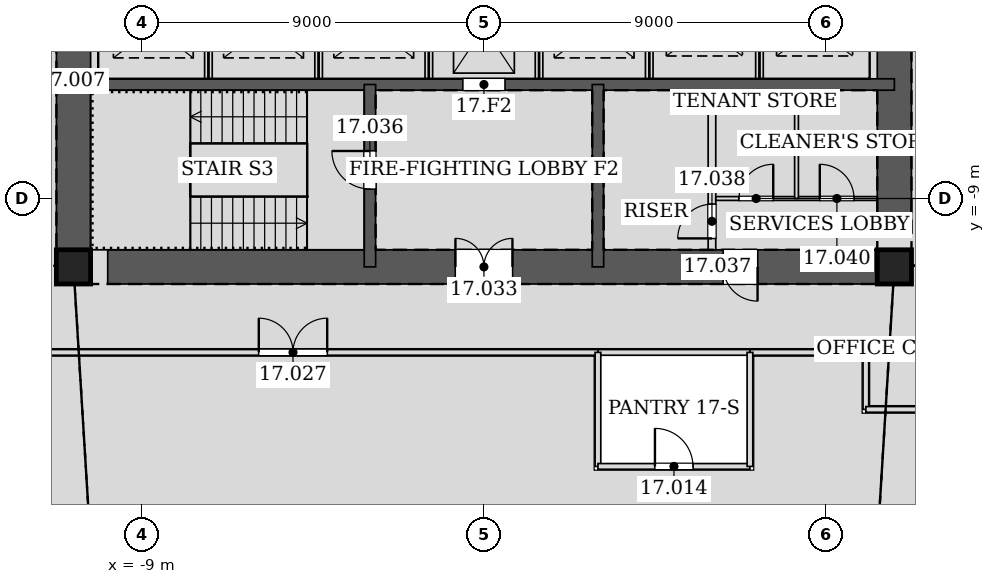
"""IFC4 building model, lengths in metres.
Left out: names, types, materials, properties, quantities, classifications, styles, units other than length and angle.
Written with IfcOpenShell. Run it as: python <this file> out.ifc"""

import sys

from ifc_helpers import new_model, si_unit, direction, frame, frame_2d, origin, origin_2d, place, context, subcontext, project, spatial, rectangle, hollow_rectangle, extrude, element, fill, save


model = new_model("IFC4")
c1 = context("Model", 3, precision=1e-05, world=origin(), true_north=direction((0.0, 1.0)))
c2 = subcontext(c1, "Body", "Model", "MODEL_VIEW")
j1 = project(units=[si_unit("LENGTHUNIT", "METRE"), si_unit("PLANEANGLEUNIT", "RADIAN")], contexts=[c1])
p1 = place(None, origin())
s1 = spatial("IfcSite", under=j1, at=p1, CompositionType="ELEMENT")
p2 = place(p1, origin())
s2 = spatial("IfcBuilding", under=s1, at=p2, CompositionType="ELEMENT")
p3 = place(p2, frame((0.0, 0.0, 79.2)))
s3 = spatial("IfcBuildingStorey", under=s2, at=p3, CompositionType="ELEMENT", Elevation=79.2)
for number, where, z_axis, x_axis in (
    (1, (-10.8, -10.8, 0.0), (0.0, 0.0, 1.0), (1.0, 0.0, 0.0)),
    (2, (10.8, -10.8, 0.0), (0.0, 0.0, 1.0), (1.0, 0.0, 0.0)),
):
    element("IfcColumn", number, at=place(p3, frame(where, z_axis=z_axis, x_axis=x_axis)), inside=s3, PredefinedType="COLUMN", context=c2, shape_type="SweptSolid", body=[
        extrude(hollow_rectangle(XDim=0.9, YDim=0.9, WallThickness=0.06, at=origin_2d()), origin(), (0.0, 0.0, 1.0), 4.2),
    ])
p4 = place(p3, frame((-10.8, -10.8, 0.0), z_axis=(0.0, 0.0, 1.0), x_axis=(1.0, 0.0, 0.0)))
e3 = element("IfcWall", 3, at=p4, inside=s3, PredefinedType="SOLIDWALL", context=c2, shape_type="SweptSolid", body=[
    extrude(rectangle(XDim=21.6, YDim=0.9, at=frame_2d((10.8, 0.0))), origin(), (0.0, 0.0, 1.0), 4.2),
])
p5 = place(p4, frame((10.05, 0.0, 0.0)))
e4 = element("IfcOpeningElement", 4, at=p5, cuts=e3, PredefinedType="OPENING", context=c2, shape_type="SweptSolid", body=[
    extrude(rectangle(XDim=1.5, YDim=2.1, at=frame_2d((0.75, 1.05))), frame((0.0, 0.46, 0.0), z_axis=(0.0, -1.0, 0.0), x_axis=(1.0, 0.0, 0.0)), (0.0, 0.0, 1.0), 0.92),
])
p6 = place(p4, frame((17.1, 0.0, 0.0)))
e5 = element("IfcOpeningElement", 5, at=p6, cuts=e3, PredefinedType="OPENING", context=c2, shape_type="SweptSolid", body=[
    extrude(rectangle(XDim=0.9, YDim=2.1, at=frame_2d((0.45, 1.05))), frame((0.0, 0.46, 0.0), z_axis=(0.0, -1.0, 0.0), x_axis=(1.0, 0.0, 0.0)), (0.0, 0.0, 1.0), 0.92),
])
p7 = place(p3, frame((10.8, -10.8, 0.0), z_axis=(0.0, 0.0, 1.0), x_axis=(0.0, 1.0, 0.0)))
e6 = element("IfcWall", 6, at=p7, inside=s3, PredefinedType="SOLIDWALL", context=c2, shape_type="SweptSolid", body=[
    extrude(rectangle(XDim=21.6, YDim=0.9, at=frame_2d((10.8, 0.0))), origin(), (0.0, 0.0, 1.0), 4.2),
])
p8 = place(p7, frame((11.7, 0.0, 0.0)))
e7 = element("IfcOpeningElement", 7, at=p8, cuts=e6, PredefinedType="OPENING", context=c2, shape_type="SweptSolid", body=[
    extrude(rectangle(XDim=1.2, YDim=2.1, at=frame_2d((0.6, 1.05))), frame((0.0, 0.46, 0.0), z_axis=(0.0, -1.0, 0.0), x_axis=(1.0, 0.0, 0.0)), (0.0, 0.0, 1.0), 0.92),
])
p9 = place(p7, frame((8.7, 0.0, 0.0)))
e8 = element("IfcOpeningElement", 8, at=p9, cuts=e6, PredefinedType="OPENING", context=c2, shape_type="SweptSolid", body=[
    extrude(rectangle(XDim=1.2, YDim=2.1, at=frame_2d((0.6, 1.05))), frame((0.0, 0.46, 0.0), z_axis=(0.0, -1.0, 0.0), x_axis=(1.0, 0.0, 0.0)), (0.0, 0.0, 1.0), 0.92),
])
p10 = place(p3, frame((-10.8, 10.8, 0.0), z_axis=(0.0, 0.0, 1.0), x_axis=(0.0, -1.0, 0.0)))
e9 = element("IfcWall", 9, at=p10, inside=s3, PredefinedType="SOLIDWALL", context=c2, shape_type="SweptSolid", body=[
    extrude(rectangle(XDim=21.6, YDim=0.9, at=frame_2d((10.8, 0.0))), origin(), (0.0, 0.0, 1.0), 4.2),
])
p11 = place(p10, frame((8.7, 0.0, 0.0)))
e10 = element("IfcOpeningElement", 10, at=p11, cuts=e9, PredefinedType="OPENING", context=c2, shape_type="SweptSolid", body=[
    extrude(rectangle(XDim=1.2, YDim=2.1, at=frame_2d((0.6, 1.05))), frame((0.0, 0.46, 0.0), z_axis=(0.0, -1.0, 0.0), x_axis=(1.0, 0.0, 0.0)), (0.0, 0.0, 1.0), 0.92),
])
p12 = place(p10, frame((11.7, 0.0, 0.0)))
e11 = element("IfcOpeningElement", 11, at=p12, cuts=e9, PredefinedType="OPENING", context=c2, shape_type="SweptSolid", body=[
    extrude(rectangle(XDim=1.2, YDim=2.1, at=frame_2d((0.6, 1.05))), frame((0.0, 0.46, 0.0), z_axis=(0.0, -1.0, 0.0), x_axis=(1.0, 0.0, 0.0)), (0.0, 0.0, 1.0), 0.92),
])
p13 = place(p3, frame((-10.8, -6.0, 0.0), z_axis=(0.0, 0.0, 1.0), x_axis=(1.0, 0.0, 0.0)))
e12 = element("IfcWall", 12, at=p13, inside=s3, PredefinedType="SOLIDWALL", context=c2, shape_type="SweptSolid", body=[
    extrude(rectangle(XDim=21.6, YDim=0.3, at=frame_2d((10.8, 0.0))), origin(), (0.0, 0.0, 1.0), 4.2),
])
p14 = place(p13, frame((10.25, 0.0, 0.0)))
e13 = element("IfcOpeningElement", 13, at=p14, cuts=e12, PredefinedType="OPENING", context=c2, shape_type="SweptSolid", body=[
    extrude(rectangle(XDim=1.1, YDim=2.1, at=frame_2d((0.55, 1.05))), frame((0.0, 0.16, 0.0), z_axis=(0.0, -1.0, 0.0), x_axis=(1.0, 0.0, 0.0)), (0.0, 0.0, 1.0), 0.32),
])
p15 = place(p3, frame((-3.0, -6.0, 0.0), z_axis=(0.0, 0.0, 1.0), x_axis=(0.0, -1.0, 0.0)))
e14 = element("IfcWall", 14, at=p15, inside=s3, PredefinedType="SOLIDWALL", context=c2, shape_type="SweptSolid", body=[
    extrude(rectangle(XDim=4.8, YDim=0.3, at=frame_2d((2.4, 0.0))), origin(), (0.0, 0.0, 1.0), 4.2),
])
p16 = place(p15, frame((1.75, 0.0, 0.0)))
e15 = element("IfcOpeningElement", 15, at=p16, cuts=e14, PredefinedType="OPENING", context=c2, shape_type="SweptSolid", body=[
    extrude(rectangle(XDim=1.0, YDim=2.1, at=frame_2d((0.5, 1.05))), frame((0.0, 0.16, 0.0), z_axis=(0.0, -1.0, 0.0), x_axis=(1.0, 0.0, 0.0)), (0.0, 0.0, 1.0), 0.32),
])
p17 = place(p3, frame((3.0, -6.0, 0.0), z_axis=(0.0, 0.0, 1.0), x_axis=(0.0, -1.0, 0.0)))
e16 = element("IfcWall", 16, at=p17, inside=s3, PredefinedType="SOLIDWALL", context=c2, shape_type="SweptSolid", body=[
    extrude(rectangle(XDim=4.8, YDim=0.3, at=frame_2d((2.4, 0.0))), origin(), (0.0, 0.0, 1.0), 4.2),
])
p18 = place(p3, frame((2.999, -13.05, 0.0), z_axis=(0.0, 0.0, 1.0), x_axis=(1.0, 0.0, 0.0)))
e17 = element("IfcWall", 17, at=p18, inside=s3, PredefinedType="PARTITIONING", context=c2, shape_type="SweptSolid", body=[
    extrude(rectangle(XDim=4.002, YDim=0.15, at=frame_2d((2.001, 0.0))), origin(), (0.0, 0.0, 1.0), 4.035),
])
p19 = place(p3, frame((-13.05, -13.05, 0.0), z_axis=(0.0, 0.0, 1.0), x_axis=(1.0, 0.0, 0.0)))
e18 = element("IfcWall", 18, at=p19, inside=s3, PredefinedType="PARTITIONING", context=c2, shape_type="SweptSolid", body=[
    extrude(rectangle(XDim=16.051, YDim=0.15, at=frame_2d((8.025, 0.0))), origin(), (0.0, 0.0, 1.0), 3.014),
])
p20 = place(p19, frame((7.125, 0.0, 0.0)))
e19 = element("IfcOpeningElement", 19, at=p20, cuts=e18, PredefinedType="OPENING", context=c2, shape_type="SweptSolid", body=[
    extrude(rectangle(XDim=1.8, YDim=2.4, at=frame_2d((0.9, 1.2))), frame((0.0, 0.085, 0.0), z_axis=(0.0, -1.0, 0.0), x_axis=(1.0, 0.0, 0.0)), (0.0, 0.0, 1.0), 0.17),
])
p21 = place(p3, frame((6.999, -13.05, 0.0), z_axis=(0.0, 0.0, 1.0), x_axis=(1.0, 0.0, 0.0)))
e20 = element("IfcWall", 20, at=p21, inside=s3, PredefinedType="PARTITIONING", context=c2, shape_type="SweptSolid", body=[
    extrude(rectangle(XDim=3.051, YDim=0.15, at=frame_2d((1.525, 0.0))), origin(), (0.0, 0.0, 1.0), 4.035),
])
p22 = place(p3, frame((10.05, -13.05, 0.0), z_axis=(0.0, 0.0, 1.0), x_axis=(0.0, -1.0, 0.0)))
e21 = element("IfcWall", 21, at=p22, inside=s3, PredefinedType="PARTITIONING", context=c2, shape_type="SweptSolid", body=[
    extrude(rectangle(XDim=1.5, YDim=0.15, at=frame_2d((0.75, 0.0))), origin(), (0.0, 0.0, 1.0), 3.492),
])
p23 = place(p3, frame((10.05, -14.55, 0.0), z_axis=(0.0, 0.0, 1.0), x_axis=(1.0, 0.0, 0.0)))
e22 = element("IfcWall", 22, at=p23, inside=s3, PredefinedType="PARTITIONING", context=c2, shape_type="SweptSolid", body=[
    extrude(rectangle(XDim=4.5, YDim=0.15, at=frame_2d((2.25, 0.0))), origin(), (0.0, 0.0, 1.0), 3.014),
])
p24 = place(p3, frame((3.0, -13.05, 0.0), z_axis=(0.0, 0.0, 1.0), x_axis=(0.0, -1.0, 0.0)))
e23 = element("IfcWall", 23, at=p24, inside=s3, PredefinedType="PARTITIONING", context=c2, shape_type="SweptSolid", body=[
    extrude(rectangle(XDim=3.0, YDim=0.15, at=frame_2d((1.5, 0.0))), origin(), (0.0, 0.0, 1.0), 3.492),
])
p25 = place(p3, frame((3.0, -16.05, 0.0), z_axis=(0.0, 0.0, 1.0), x_axis=(1.0, 0.0, 0.0)))
e24 = element("IfcWall", 24, at=p25, inside=s3, PredefinedType="PARTITIONING", context=c2, shape_type="SweptSolid", body=[
    extrude(rectangle(XDim=4.0, YDim=0.15, at=frame_2d((2.0, 0.0))), origin(), (0.0, 0.0, 1.0), 4.035),
])
p26 = place(p25, frame((1.5, 0.0, 0.0)))
e25 = element("IfcOpeningElement", 25, at=p26, cuts=e24, PredefinedType="OPENING", context=c2, shape_type="SweptSolid", body=[
    extrude(rectangle(XDim=1.0, YDim=2.1, at=frame_2d((0.5, 1.05))), frame((0.0, 0.085, 0.0), z_axis=(0.0, -1.0, 0.0), x_axis=(1.0, 0.0, 0.0)), (0.0, 0.0, 1.0), 0.17),
])
p27 = place(p3, frame((7.0, -16.05, 0.0), z_axis=(0.0, 0.0, 1.0), x_axis=(0.0, 1.0, 0.0)))
e26 = element("IfcWall", 26, at=p27, inside=s3, PredefinedType="PARTITIONING", context=c2, shape_type="SweptSolid", body=[
    extrude(rectangle(XDim=3.0, YDim=0.15, at=frame_2d((1.5, 0.0))), origin(), (0.0, 0.0, 1.0), 3.492),
])
for number, where, z_axis, x_axis in (
    (27, (-7.25, -5.85, 0.0), (0.0, 0.0, 1.0), (0.0, 1.0, 0.0)),
    (28, (-4.35, -5.85, 0.0), (0.0, 0.0, 1.0), (0.0, 1.0, 0.0)),
    (29, (-1.45, -5.85, 0.0), (0.0, 0.0, 1.0), (0.0, 1.0, 0.0)),
    (30, (1.45, -5.85, 0.0), (0.0, 0.0, 1.0), (0.0, 1.0, 0.0)),
    (31, (4.35, -5.85, 0.0), (0.0, 0.0, 1.0), (0.0, 1.0, 0.0)),
    (32, (7.25, -5.85, 0.0), (0.0, 0.0, 1.0), (0.0, 1.0, 0.0)),
):
    element("IfcWall", number, at=place(p3, frame(where, z_axis=z_axis, x_axis=x_axis)), inside=s3, PredefinedType="PARTITIONING", context=c2, shape_type="SweptSolid", body=[
        extrude(rectangle(XDim=2.7, YDim=0.2, at=frame_2d((1.35, 0.0))), origin(), (0.0, 0.0, 1.0), 4.2),
    ])
p28 = place(p3, frame((6.0, -10.35, 0.0), z_axis=(0.0, 0.0, 1.0), x_axis=(0.0, 1.0, 0.0)))
e33 = element("IfcWall", 33, at=p28, inside=s3, PredefinedType="PARTITIONING", context=c2, shape_type="SweptSolid", body=[
    extrude(rectangle(XDim=4.2, YDim=0.2, at=frame_2d((2.1, 0.0))), origin(), (0.0, 0.0, 1.0), 4.035),
])
p29 = place(p28, frame((0.3, 0.0, 0.0)))
e34 = element("IfcOpeningElement", 34, at=p29, cuts=e33, PredefinedType="OPENING", context=c2, shape_type="SweptSolid", body=[
    extrude(rectangle(XDim=0.9, YDim=2.1, at=frame_2d((0.45, 1.05))), frame((0.0, 0.11, 0.0), z_axis=(0.0, -1.0, 0.0), x_axis=(1.0, 0.0, 0.0)), (0.0, 0.0, 1.0), 0.22),
])
p30 = place(p3, frame((6.1, -9.0, 0.0), z_axis=(0.0, 0.0, 1.0), x_axis=(1.0, 0.0, 0.0)))
e35 = element("IfcWall", 35, at=p30, inside=s3, PredefinedType="PARTITIONING", context=c2, shape_type="SweptSolid", body=[
    extrude(rectangle(XDim=4.25, YDim=0.1, at=frame_2d((2.125, 0.0))), origin(), (0.0, 0.0, 1.0), 4.035),
])
p31 = place(p30, frame((0.613, 0.0, 0.0)))
e36 = element("IfcOpeningElement", 36, at=p31, cuts=e35, PredefinedType="OPENING", context=c2, shape_type="SweptSolid", body=[
    extrude(rectangle(XDim=0.9, YDim=2.1, at=frame_2d((0.45, 1.05))), frame((0.0, 0.06, 0.0), z_axis=(0.0, -1.0, 0.0), x_axis=(1.0, 0.0, 0.0)), (0.0, 0.0, 1.0), 0.12),
])
p32 = place(p30, frame((2.738, 0.0, 0.0)))
e37 = element("IfcOpeningElement", 37, at=p32, cuts=e35, PredefinedType="OPENING", context=c2, shape_type="SweptSolid", body=[
    extrude(rectangle(XDim=0.9, YDim=2.1, at=frame_2d((0.45, 1.05))), frame((0.0, 0.06, 0.0), z_axis=(0.0, -1.0, 0.0), x_axis=(1.0, 0.0, 0.0)), (0.0, 0.0, 1.0), 0.12),
])
p33 = place(p3, frame((8.225, -9.0, 0.0), z_axis=(0.0, 0.0, 1.0), x_axis=(0.0, 1.0, 0.0)))
e38 = element("IfcWall", 38, at=p33, inside=s3, PredefinedType="PARTITIONING", context=c2, shape_type="SweptSolid", body=[
    extrude(rectangle(XDim=2.85, YDim=0.1, at=frame_2d((1.425, 0.0))), origin(), (0.0, 0.0, 1.0), 4.035),
])
p34 = place(p26, origin())
e39 = element("IfcDoor", 39, at=p34, inside=s3, OperationType="SINGLE_SWING_LEFT", PredefinedType="DOOR", context=c2, shape_type="SweptSolid", body=[
    extrude(rectangle(XDim=1.0, YDim=2.1, at=frame_2d((0.5, 1.05))), frame((0.0, 0.025, 0.0), z_axis=(0.0, -1.0, 0.0), x_axis=(1.0, 0.0, 0.0)), (0.0, 0.0, 1.0), 0.05),
])
fill(e25, e39)
p35 = place(p20, origin())
e40 = element("IfcDoor", 40, at=p35, inside=s3, OperationType="DOUBLE_DOOR_SINGLE_SWING", PredefinedType="DOOR", context=c2, shape_type="SweptSolid", body=[
    extrude(rectangle(XDim=1.8, YDim=2.4, at=frame_2d((0.9, 1.2))), frame((0.0, 0.025, 0.0), z_axis=(0.0, -1.0, 0.0), x_axis=(1.0, 0.0, 0.0)), (0.0, 0.0, 1.0), 0.05),
])
fill(e19, e40)
p36 = place(p5, origin())
e41 = element("IfcDoor", 41, at=p36, inside=s3, OperationType="DOUBLE_DOOR_SINGLE_SWING", PredefinedType="DOOR", context=c2, shape_type="SweptSolid", body=[
    extrude(rectangle(XDim=1.5, YDim=2.1, at=frame_2d((0.75, 1.05))), frame((0.0, 0.025, 0.0), z_axis=(0.0, -1.0, 0.0), x_axis=(1.0, 0.0, 0.0)), (0.0, 0.0, 1.0), 0.05),
])
fill(e4, e41)
p37 = place(p16, frame((1.0, 0.0, 0.0), z_axis=(0.0, 0.0, 1.0), x_axis=(-1.0, 0.0, 0.0)))
e42 = element("IfcDoor", 42, at=p37, inside=s3, OperationType="SINGLE_SWING_RIGHT", PredefinedType="DOOR", context=c2, shape_type="SweptSolid", body=[
    extrude(rectangle(XDim=1.0, YDim=2.1, at=frame_2d((0.5, 1.05))), frame((0.0, 0.025, 0.0), z_axis=(0.0, -1.0, 0.0), x_axis=(1.0, 0.0, 0.0)), (0.0, 0.0, 1.0), 0.05),
])
fill(e15, e42)
p38 = place(p6, frame((0.9, 0.0, 0.0), z_axis=(0.0, 0.0, 1.0), x_axis=(-1.0, 0.0, 0.0)))
e43 = element("IfcDoor", 43, at=p38, inside=s3, OperationType="SINGLE_SWING_LEFT", PredefinedType="DOOR", context=c2, shape_type="SweptSolid", body=[
    extrude(rectangle(XDim=0.9, YDim=2.1, at=frame_2d((0.45, 1.05))), frame((0.0, 0.025, 0.0), z_axis=(0.0, -1.0, 0.0), x_axis=(1.0, 0.0, 0.0)), (0.0, 0.0, 1.0), 0.05),
])
fill(e5, e43)
p39 = place(p29, origin())
e44 = element("IfcDoor", 44, at=p39, inside=s3, OperationType="SINGLE_SWING_LEFT", PredefinedType="DOOR", context=c2, shape_type="SweptSolid", body=[
    extrude(rectangle(XDim=0.9, YDim=2.1, at=frame_2d((0.45, 1.05))), frame((0.0, 0.025, 0.0), z_axis=(0.0, -1.0, 0.0), x_axis=(1.0, 0.0, 0.0)), (0.0, 0.0, 1.0), 0.05),
])
fill(e34, e44)
p40 = place(p31, origin())
e45 = element("IfcDoor", 45, at=p40, inside=s3, OperationType="SINGLE_SWING_RIGHT", PredefinedType="DOOR", context=c2, shape_type="SweptSolid", body=[
    extrude(rectangle(XDim=0.9, YDim=2.1, at=frame_2d((0.45, 1.05))), frame((0.0, 0.025, 0.0), z_axis=(0.0, -1.0, 0.0), x_axis=(1.0, 0.0, 0.0)), (0.0, 0.0, 1.0), 0.05),
])
fill(e36, e45)
p41 = place(p32, origin())
e46 = element("IfcDoor", 46, at=p41, inside=s3, OperationType="SINGLE_SWING_LEFT", PredefinedType="DOOR", context=c2, shape_type="SweptSolid", body=[
    extrude(rectangle(XDim=0.9, YDim=2.1, at=frame_2d((0.45, 1.05))), frame((0.0, 0.025, 0.0), z_axis=(0.0, -1.0, 0.0), x_axis=(1.0, 0.0, 0.0)), (0.0, 0.0, 1.0), 0.05),
])
fill(e37, e46)
p42 = place(p14, origin())
e47 = element("IfcDoor", 47, at=p42, inside=s3, OperationType="DOUBLE_DOOR_SLIDING", PredefinedType="DOOR", context=c2, shape_type="SweptSolid", body=[
    extrude(rectangle(XDim=1.1, YDim=2.1, at=frame_2d((0.55, 1.05))), frame((0.0, 0.025, 0.0), z_axis=(0.0, -1.0, 0.0), x_axis=(1.0, 0.0, 0.0)), (0.0, 0.0, 1.0), 0.05),
])
fill(e13, e47)
save(model, sys.argv[1])
